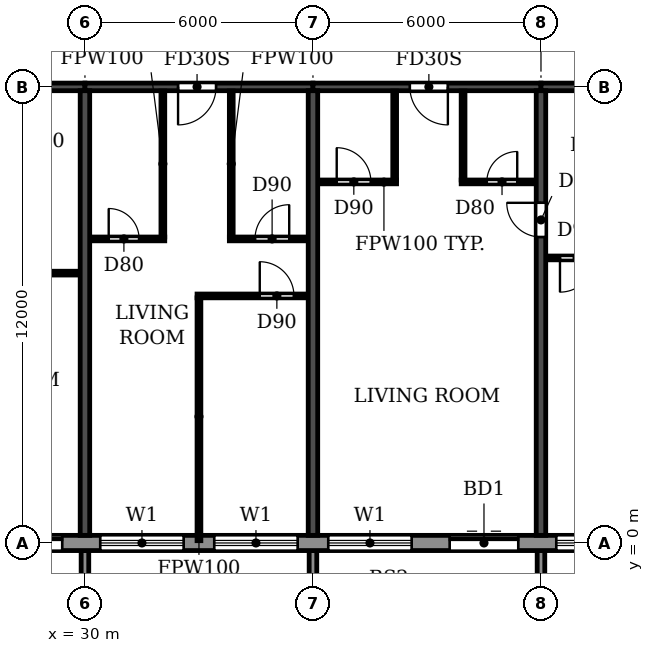
"""IFC4 building model, lengths in metres.
Left out: names, types, materials, properties, quantities, classifications, styles, units other than length and angle.
Written with IfcOpenShell. Run it as: python <this file> out.ifc"""

import sys

from ifc_helpers import new_model, si_unit, direction, frame, frame_2d, origin, place, context, subcontext, project, spatial, polyline, rectangle, outline, extrude, source, transform, mapped, element, fill, save


model = new_model("IFC4")
c1 = context("Model", 3, precision=1e-05, world=origin(), true_north=direction((0.0, 1.0)))
c2 = subcontext(c1, "Body", "Model", "MODEL_VIEW")
j1 = project(units=[si_unit("LENGTHUNIT", "METRE"), si_unit("PLANEANGLEUNIT", "RADIAN")], contexts=[c1])
p1 = place(None, origin())
s1 = spatial("IfcSite", under=j1, at=p1, CompositionType="ELEMENT")
p2 = place(p1, origin())
s2 = spatial("IfcBuilding", under=s1, at=p2, CompositionType="ELEMENT")
p3 = place(p2, frame((0.0, 0.0, 171.9)))
s3 = spatial("IfcBuildingStorey", under=s2, at=p3, CompositionType="ELEMENT", Elevation=171.9)
for number, where, z_axis, x_axis in (
    (1, (30.0, 0.2, 0.0), (0.0, 0.0, 1.0), (0.0, 1.0, 0.0)),
    (2, (36.0, 0.2, 0.0), (0.0, 0.0, 1.0), (0.0, 1.0, 0.0)),
):
    element("IfcWall", number, at=place(p3, frame(where, z_axis=z_axis, x_axis=x_axis)), inside=s3, PredefinedType="SHEAR", context=c2, shape_type="SweptSolid", body=[
        extrude(rectangle(XDim=11.7, YDim=0.25, at=frame_2d((5.85, 0.0))), origin(), (0.0, 0.0, 1.0), 3.08),
    ])
p4 = place(p3, frame((42.0, 0.2, 0.0), z_axis=(0.0, 0.0, 1.0), x_axis=(0.0, 1.0, 0.0)))
e3 = element("IfcWall", 3, at=p4, inside=s3, PredefinedType="SHEAR", context=c2, shape_type="SweptSolid", body=[
    extrude(rectangle(XDim=11.7, YDim=0.25, at=frame_2d((5.85, 0.0))), origin(), (0.0, 0.0, 1.0), 3.08),
])
p5 = place(p4, frame((7.85, 0.0, 0.0)))
e4 = element("IfcOpeningElement", 4, at=p5, cuts=e3, PredefinedType="OPENING", context=c2, shape_type="SweptSolid", body=[
    extrude(rectangle(XDim=0.9, YDim=2.1, at=frame_2d((0.45, 1.05))), frame((0.0, 0.135, 0.0), z_axis=(0.0, -1.0, 0.0), x_axis=(1.0, 0.0, 0.0)), (0.0, 0.0, 1.0), 0.27),
])
p6 = place(p3, frame((24.0, 12.0, 0.0), z_axis=(0.0, 0.0, 1.0), x_axis=(1.0, 0.0, 0.0)))
e5 = element("IfcWall", 5, at=p6, inside=s3, PredefinedType="SHEAR", context=c2, shape_type="SweptSolid", body=[
    extrude(rectangle(XDim=6.0, YDim=0.2, at=frame_2d((3.0, 0.0))), origin(), (0.0, 0.0, 1.0), 2.48),
])
p7 = place(p6, frame((2.55, 0.0, 0.0)))
e6 = element("IfcOpeningElement", 6, at=p7, cuts=e5, PredefinedType="OPENING", context=c2, shape_type="SweptSolid", body=[
    extrude(rectangle(XDim=1.0, YDim=2.1, at=frame_2d((0.5, 1.05))), frame((0.0, 0.11, 0.0), z_axis=(0.0, -1.0, 0.0), x_axis=(1.0, 0.0, 0.0)), (0.0, 0.0, 1.0), 0.22),
])
p8 = place(p3, frame((30.0, 12.0, 0.0), z_axis=(0.0, 0.0, 1.0), x_axis=(1.0, 0.0, 0.0)))
e7 = element("IfcWall", 7, at=p8, inside=s3, PredefinedType="SHEAR", context=c2, shape_type="SweptSolid", body=[
    extrude(rectangle(XDim=6.0, YDim=0.2, at=frame_2d((3.0, 0.0))), origin(), (0.0, 0.0, 1.0), 2.48),
])
p9 = place(p8, frame((2.45, 0.0, 0.0)))
e8 = element("IfcOpeningElement", 8, at=p9, cuts=e7, PredefinedType="OPENING", context=c2, shape_type="SweptSolid", body=[
    extrude(rectangle(XDim=1.0, YDim=2.1, at=frame_2d((0.5, 1.05))), frame((0.0, 0.11, 0.0), z_axis=(0.0, -1.0, 0.0), x_axis=(1.0, 0.0, 0.0)), (0.0, 0.0, 1.0), 0.22),
])
p10 = place(p3, frame((36.0, 12.0, 0.0), z_axis=(0.0, 0.0, 1.0), x_axis=(1.0, 0.0, 0.0)))
e9 = element("IfcWall", 9, at=p10, inside=s3, PredefinedType="SHEAR", context=c2, shape_type="SweptSolid", body=[
    extrude(rectangle(XDim=6.0, YDim=0.2, at=frame_2d((3.0, 0.0))), origin(), (0.0, 0.0, 1.0), 2.48),
])
p11 = place(p10, frame((2.55, 0.0, 0.0)))
e10 = element("IfcOpeningElement", 10, at=p11, cuts=e9, PredefinedType="OPENING", context=c2, shape_type="SweptSolid", body=[
    extrude(rectangle(XDim=1.0, YDim=2.1, at=frame_2d((0.5, 1.05))), frame((0.0, 0.11, 0.0), z_axis=(0.0, -1.0, 0.0), x_axis=(1.0, 0.0, 0.0)), (0.0, 0.0, 1.0), 0.22),
])
p12 = place(p3, frame((42.0, 12.0, 0.0), z_axis=(0.0, 0.0, 1.0), x_axis=(1.0, 0.0, 0.0)))
e11 = element("IfcWall", 11, at=p12, inside=s3, PredefinedType="SHEAR", context=c2, shape_type="SweptSolid", body=[
    extrude(rectangle(XDim=6.0, YDim=0.2, at=frame_2d((3.0, 0.0))), origin(), (0.0, 0.0, 1.0), 2.48),
])
p13 = place(p3, frame((22.683, 0.0, 0.0), z_axis=(0.0, 0.0, 1.0), x_axis=(1.0, 0.0, 0.0)))
e12 = element("IfcWall", 12, at=p13, inside=s3, PredefinedType="STANDARD", context=c2, shape_type="SweptSolid", body=[
    extrude(rectangle(XDim=56.634, YDim=0.4, at=frame_2d((28.317, 0.0))), origin(), (0.0, 0.0, 1.0), 3.08),
])
p14 = place(p13, frame((1.717, 0.0, 0.9)))
e13 = element("IfcOpeningElement", 13, at=p14, cuts=e12, PredefinedType="OPENING", context=c2, shape_type="SweptSolid", body=[
    extrude(rectangle(XDim=2.2, YDim=1.5, at=frame_2d((1.1, 0.75))), frame((0.0, 0.21, 0.0), z_axis=(0.0, -1.0, 0.0), x_axis=(1.0, 0.0, 0.0)), (0.0, 0.0, 1.0), 0.42),
])
p15 = place(p13, frame((4.917, 0.0, 0.0)))
e14 = element("IfcOpeningElement", 14, at=p15, cuts=e12, PredefinedType="OPENING", context=c2, shape_type="SweptSolid", body=[
    extrude(rectangle(XDim=1.8, YDim=2.4, at=frame_2d((0.9, 1.2))), frame((0.0, 0.21, 0.0), z_axis=(0.0, -1.0, 0.0), x_axis=(1.0, 0.0, 0.0)), (0.0, 0.0, 1.0), 0.42),
])
p16 = place(p13, frame((7.717, 0.0, 0.9)))
e15 = element("IfcOpeningElement", 15, at=p16, cuts=e12, PredefinedType="OPENING", context=c2, shape_type="SweptSolid", body=[
    extrude(rectangle(XDim=2.2, YDim=1.5, at=frame_2d((1.1, 0.75))), frame((0.0, 0.21, 0.0), z_axis=(0.0, -1.0, 0.0), x_axis=(1.0, 0.0, 0.0)), (0.0, 0.0, 1.0), 0.42),
])
p17 = place(p13, frame((10.717, 0.0, 0.9)))
e16 = element("IfcOpeningElement", 16, at=p17, cuts=e12, PredefinedType="OPENING", context=c2, shape_type="SweptSolid", body=[
    extrude(rectangle(XDim=2.2, YDim=1.5, at=frame_2d((1.1, 0.75))), frame((0.0, 0.21, 0.0), z_axis=(0.0, -1.0, 0.0), x_axis=(1.0, 0.0, 0.0)), (0.0, 0.0, 1.0), 0.42),
])
p18 = place(p13, frame((13.717, 0.0, 0.9)))
e17 = element("IfcOpeningElement", 17, at=p18, cuts=e12, PredefinedType="OPENING", context=c2, shape_type="SweptSolid", body=[
    extrude(rectangle(XDim=2.2, YDim=1.5, at=frame_2d((1.1, 0.75))), frame((0.0, 0.21, 0.0), z_axis=(0.0, -1.0, 0.0), x_axis=(1.0, 0.0, 0.0)), (0.0, 0.0, 1.0), 0.42),
])
p19 = place(p13, frame((16.917, 0.0, 0.0)))
e18 = element("IfcOpeningElement", 18, at=p19, cuts=e12, PredefinedType="OPENING", context=c2, shape_type="SweptSolid", body=[
    extrude(rectangle(XDim=1.8, YDim=2.4, at=frame_2d((0.9, 1.2))), frame((0.0, 0.21, 0.0), z_axis=(0.0, -1.0, 0.0), x_axis=(1.0, 0.0, 0.0)), (0.0, 0.0, 1.0), 0.42),
])
p20 = place(p13, frame((19.717, 0.0, 0.9)))
e19 = element("IfcOpeningElement", 19, at=p20, cuts=e12, PredefinedType="OPENING", context=c2, shape_type="SweptSolid", body=[
    extrude(rectangle(XDim=2.2, YDim=1.5, at=frame_2d((1.1, 0.75))), frame((0.0, 0.21, 0.0), z_axis=(0.0, -1.0, 0.0), x_axis=(1.0, 0.0, 0.0)), (0.0, 0.0, 1.0), 0.42),
])
p21 = place(p13, frame((22.717, 0.0, 0.9)))
e20 = element("IfcOpeningElement", 20, at=p21, cuts=e12, PredefinedType="OPENING", context=c2, shape_type="SweptSolid", body=[
    extrude(rectangle(XDim=2.2, YDim=1.5, at=frame_2d((1.1, 0.75))), frame((0.0, 0.21, 0.0), z_axis=(0.0, -1.0, 0.0), x_axis=(1.0, 0.0, 0.0)), (0.0, 0.0, 1.0), 0.42),
])
p22 = place(p13, frame((25.917, 0.0, 0.0)))
e21 = element("IfcOpeningElement", 21, at=p22, cuts=e12, PredefinedType="OPENING", context=c2, shape_type="SweptSolid", body=[
    extrude(rectangle(XDim=1.8, YDim=2.4, at=frame_2d((0.9, 1.2))), frame((0.0, 0.21, 0.0), z_axis=(0.0, -1.0, 0.0), x_axis=(1.0, 0.0, 0.0)), (0.0, 0.0, 1.0), 0.42),
])
p23 = place(p13, frame((28.717, 0.0, 0.9)))
e22 = element("IfcOpeningElement", 22, at=p23, cuts=e12, PredefinedType="OPENING", context=c2, shape_type="SweptSolid", body=[
    extrude(rectangle(XDim=2.2, YDim=1.5, at=frame_2d((1.1, 0.75))), frame((0.0, 0.21, 0.0), z_axis=(0.0, -1.0, 0.0), x_axis=(1.0, 0.0, 0.0)), (0.0, 0.0, 1.0), 0.42),
])
p24 = place(p13, frame((31.717, 0.0, 0.9)))
e23 = element("IfcOpeningElement", 23, at=p24, cuts=e12, PredefinedType="OPENING", context=c2, shape_type="SweptSolid", body=[
    extrude(rectangle(XDim=2.2, YDim=1.5, at=frame_2d((1.1, 0.75))), frame((0.0, 0.21, 0.0), z_axis=(0.0, -1.0, 0.0), x_axis=(1.0, 0.0, 0.0)), (0.0, 0.0, 1.0), 0.42),
])
p25 = place(p13, frame((34.717, 0.0, 0.9)))
e24 = element("IfcOpeningElement", 24, at=p25, cuts=e12, PredefinedType="OPENING", context=c2, shape_type="SweptSolid", body=[
    extrude(rectangle(XDim=2.2, YDim=1.5, at=frame_2d((1.1, 0.75))), frame((0.0, 0.21, 0.0), z_axis=(0.0, -1.0, 0.0), x_axis=(1.0, 0.0, 0.0)), (0.0, 0.0, 1.0), 0.42),
])
p26 = place(p13, frame((37.717, 0.0, 0.9)))
e25 = element("IfcOpeningElement", 25, at=p26, cuts=e12, PredefinedType="OPENING", context=c2, shape_type="SweptSolid", body=[
    extrude(rectangle(XDim=2.2, YDim=1.5, at=frame_2d((1.1, 0.75))), frame((0.0, 0.21, 0.0), z_axis=(0.0, -1.0, 0.0), x_axis=(1.0, 0.0, 0.0)), (0.0, 0.0, 1.0), 0.42),
])
p27 = place(p13, frame((40.917, 0.0, 0.0)))
e26 = element("IfcOpeningElement", 26, at=p27, cuts=e12, PredefinedType="OPENING", context=c2, shape_type="SweptSolid", body=[
    extrude(rectangle(XDim=1.8, YDim=2.4, at=frame_2d((0.9, 1.2))), frame((0.0, 0.21, 0.0), z_axis=(0.0, -1.0, 0.0), x_axis=(1.0, 0.0, 0.0)), (0.0, 0.0, 1.0), 0.42),
])
p28 = place(p13, frame((43.717, 0.0, 0.9)))
e27 = element("IfcOpeningElement", 27, at=p28, cuts=e12, PredefinedType="OPENING", context=c2, shape_type="SweptSolid", body=[
    extrude(rectangle(XDim=2.2, YDim=1.5, at=frame_2d((1.1, 0.75))), frame((0.0, 0.21, 0.0), z_axis=(0.0, -1.0, 0.0), x_axis=(1.0, 0.0, 0.0)), (0.0, 0.0, 1.0), 0.42),
])
p29 = place(p13, frame((46.717, 0.0, 0.9)))
e28 = element("IfcOpeningElement", 28, at=p29, cuts=e12, PredefinedType="OPENING", context=c2, shape_type="SweptSolid", body=[
    extrude(rectangle(XDim=2.2, YDim=1.5, at=frame_2d((1.1, 0.75))), frame((0.0, 0.21, 0.0), z_axis=(0.0, -1.0, 0.0), x_axis=(1.0, 0.0, 0.0)), (0.0, 0.0, 1.0), 0.42),
])
p30 = place(p13, frame((49.717, 0.0, 0.9)))
e29 = element("IfcOpeningElement", 29, at=p30, cuts=e12, PredefinedType="OPENING", context=c2, shape_type="SweptSolid", body=[
    extrude(rectangle(XDim=2.2, YDim=1.5, at=frame_2d((1.1, 0.75))), frame((0.0, 0.21, 0.0), z_axis=(0.0, -1.0, 0.0), x_axis=(1.0, 0.0, 0.0)), (0.0, 0.0, 1.0), 0.42),
])
p31 = place(p13, frame((52.917, 0.0, 0.0)))
e30 = element("IfcOpeningElement", 30, at=p31, cuts=e12, PredefinedType="OPENING", context=c2, shape_type="SweptSolid", body=[
    extrude(rectangle(XDim=1.8, YDim=2.4, at=frame_2d((0.9, 1.2))), frame((0.0, 0.21, 0.0), z_axis=(0.0, -1.0, 0.0), x_axis=(1.0, 0.0, 0.0)), (0.0, 0.0, 1.0), 0.42),
])
m1 = source(origin(), c2, "Body", "SweptSolid", [
    extrude(outline(polyline([(0.0, 0.0), (0.2, 0.0), (0.2, 1.65), (0.0, 1.65), (0.0, 0.0)])), origin(), (0.0, 0.0, 1.0), 3.1),
])
for number, where in (
    (31, (29.9, -1.85, 0.0)),
    (32, (35.9, -1.85, 0.0)),
    (33, (41.9, -1.85, 0.0)),
):
    element("IfcWall", number, at=place(p3, frame(where)), inside=s3, PredefinedType="STANDARD", context=c2, shape_type="MappedRepresentation", body=[
        mapped(m1, transform((0.0, 0.0, 0.0))),
    ])
p32 = place(p3, frame((32.95, 6.5, 0.0), z_axis=(0.0, 0.0, 1.0), x_axis=(1.0, 0.0, 0.0)))
e34 = element("IfcWall", 34, at=p32, inside=s3, PredefinedType="PARTITIONING", context=c2, shape_type="SweptSolid", body=[
    extrude(rectangle(XDim=2.915, YDim=0.1, at=frame_2d((1.458, 0.0))), origin(), (0.0, 0.0, 1.0), 3.08),
])
p33 = place(p32, frame((1.65, 0.0, 0.0)))
e35 = element("IfcOpeningElement", 35, at=p33, cuts=e34, PredefinedType="OPENING", context=c2, shape_type="SweptSolid", body=[
    extrude(rectangle(XDim=0.9, YDim=2.1, at=frame_2d((0.45, 1.05))), frame((0.0, 0.06, 0.0), z_axis=(0.0, -1.0, 0.0), x_axis=(1.0, 0.0, 0.0)), (0.0, 0.0, 1.0), 0.12),
])
p34 = place(p3, frame((27.9, 7.1, 0.0), z_axis=(0.0, 0.0, 1.0), x_axis=(1.0, 0.0, 0.0)))
e36 = element("IfcWall", 36, at=p34, inside=s3, PredefinedType="PARTITIONING", context=c2, shape_type="SweptSolid", body=[
    extrude(rectangle(XDim=1.965, YDim=0.1, at=frame_2d((0.982, 0.0))), origin(), (0.0, 0.0, 1.0), 3.08),
])
p35 = place(p3, frame((42.135, 7.5, 0.0), z_axis=(0.0, 0.0, 1.0), x_axis=(1.0, 0.0, 0.0)))
e37 = element("IfcWall", 37, at=p35, inside=s3, PredefinedType="PARTITIONING", context=c2, shape_type="SweptSolid", body=[
    extrude(rectangle(XDim=2.765, YDim=0.1, at=frame_2d((1.382, 0.0))), origin(), (0.0, 0.0, 1.0), 3.08),
])
p36 = place(p35, frame((0.365, 0.0, 0.0)))
e38 = element("IfcOpeningElement", 38, at=p36, cuts=e37, PredefinedType="OPENING", context=c2, shape_type="SweptSolid", body=[
    extrude(rectangle(XDim=0.9, YDim=2.1, at=frame_2d((0.45, 1.05))), frame((0.0, 0.06, 0.0), z_axis=(0.0, -1.0, 0.0), x_axis=(1.0, 0.0, 0.0)), (0.0, 0.0, 1.0), 0.12),
])
p37 = place(p3, frame((30.135, 8.0, 0.0), z_axis=(0.0, 0.0, 1.0), x_axis=(1.0, 0.0, 0.0)))
e39 = element("IfcWall", 39, at=p37, inside=s3, PredefinedType="PARTITIONING", context=c2, shape_type="SweptSolid", body=[
    extrude(rectangle(XDim=1.965, YDim=0.1, at=frame_2d((0.982, 0.0))), origin(), (0.0, 0.0, 1.0), 3.08),
])
p38 = place(p37, frame((0.49, 0.0, 0.0)))
e40 = element("IfcOpeningElement", 40, at=p38, cuts=e39, PredefinedType="OPENING", context=c2, shape_type="SweptSolid", body=[
    extrude(rectangle(XDim=0.8, YDim=2.1, at=frame_2d((0.4, 1.05))), frame((0.0, 0.06, 0.0), z_axis=(0.0, -1.0, 0.0), x_axis=(1.0, 0.0, 0.0)), (0.0, 0.0, 1.0), 0.12),
])
p39 = place(p3, frame((33.8, 8.0, 0.0), z_axis=(0.0, 0.0, 1.0), x_axis=(1.0, 0.0, 0.0)))
e41 = element("IfcWall", 41, at=p39, inside=s3, PredefinedType="PARTITIONING", context=c2, shape_type="SweptSolid", body=[
    extrude(rectangle(XDim=2.065, YDim=0.1, at=frame_2d((1.032, 0.0))), origin(), (0.0, 0.0, 1.0), 3.08),
])
p40 = place(p39, frame((0.675, 0.0, 0.0)))
e42 = element("IfcOpeningElement", 42, at=p40, cuts=e41, PredefinedType="OPENING", context=c2, shape_type="SweptSolid", body=[
    extrude(rectangle(XDim=0.9, YDim=2.1, at=frame_2d((0.45, 1.05))), frame((0.0, 0.06, 0.0), z_axis=(0.0, -1.0, 0.0), x_axis=(1.0, 0.0, 0.0)), (0.0, 0.0, 1.0), 0.12),
])
p41 = place(p3, frame((36.135, 9.5, 0.0), z_axis=(0.0, 0.0, 1.0), x_axis=(1.0, 0.0, 0.0)))
e43 = element("IfcWall", 43, at=p41, inside=s3, PredefinedType="PARTITIONING", context=c2, shape_type="SweptSolid", body=[
    extrude(rectangle(XDim=2.065, YDim=0.1, at=frame_2d((1.032, 0.0))), origin(), (0.0, 0.0, 1.0), 3.08),
])
p42 = place(p41, frame((0.49, 0.0, 0.0)))
e44 = element("IfcOpeningElement", 44, at=p42, cuts=e43, PredefinedType="OPENING", context=c2, shape_type="SweptSolid", body=[
    extrude(rectangle(XDim=0.9, YDim=2.1, at=frame_2d((0.45, 1.05))), frame((0.0, 0.06, 0.0), z_axis=(0.0, -1.0, 0.0), x_axis=(1.0, 0.0, 0.0)), (0.0, 0.0, 1.0), 0.12),
])
p43 = place(p3, frame((39.9, 9.5, 0.0), z_axis=(0.0, 0.0, 1.0), x_axis=(1.0, 0.0, 0.0)))
e45 = element("IfcWall", 45, at=p43, inside=s3, PredefinedType="PARTITIONING", context=c2, shape_type="SweptSolid", body=[
    extrude(rectangle(XDim=1.965, YDim=0.1, at=frame_2d((0.982, 0.0))), origin(), (0.0, 0.0, 1.0), 3.08),
])
p44 = place(p43, frame((0.675, 0.0, 0.0)))
e46 = element("IfcOpeningElement", 46, at=p44, cuts=e45, PredefinedType="OPENING", context=c2, shape_type="SweptSolid", body=[
    extrude(rectangle(XDim=0.8, YDim=2.1, at=frame_2d((0.4, 1.05))), frame((0.0, 0.06, 0.0), z_axis=(0.0, -1.0, 0.0), x_axis=(1.0, 0.0, 0.0)), (0.0, 0.0, 1.0), 0.12),
])
p45 = place(p3, frame((32.05, 8.05, 0.0), z_axis=(0.0, 0.0, 1.0), x_axis=(0.0, 1.0, 0.0)))
e47 = element("IfcWall", 47, at=p45, inside=s3, PredefinedType="PARTITIONING", context=c2, shape_type="SweptSolid", body=[
    extrude(rectangle(XDim=3.84, YDim=0.1, at=frame_2d((1.92, 0.0))), origin(), (0.0, 0.0, 1.0), 3.08),
])
p46 = place(p3, frame((33.0, 0.06, 0.0), z_axis=(0.0, 0.0, 1.0), x_axis=(0.0, 1.0, 0.0)))
e48 = element("IfcWall", 48, at=p46, inside=s3, PredefinedType="PARTITIONING", context=c2, shape_type="SweptSolid", body=[
    extrude(rectangle(XDim=6.39, YDim=0.1, at=frame_2d((3.195, 0.0))), origin(), (0.0, 0.0, 1.0), 3.08),
])
p47 = place(p3, frame((33.85, 8.05, 0.0), z_axis=(0.0, 0.0, 1.0), x_axis=(0.0, 1.0, 0.0)))
e49 = element("IfcWall", 49, at=p47, inside=s3, PredefinedType="PARTITIONING", context=c2, shape_type="SweptSolid", body=[
    extrude(rectangle(XDim=3.84, YDim=0.1, at=frame_2d((1.92, 0.0))), origin(), (0.0, 0.0, 1.0), 3.08),
])
for number, where, z_axis, x_axis in (
    (50, (38.15, 9.55, 0.0), (0.0, 0.0, 1.0), (0.0, 1.0, 0.0)),
    (51, (39.95, 9.55, 0.0), (0.0, 0.0, 1.0), (0.0, 1.0, 0.0)),
):
    element("IfcWall", number, at=place(p3, frame(where, z_axis=z_axis, x_axis=x_axis)), inside=s3, PredefinedType="PARTITIONING", context=c2, shape_type="SweptSolid", body=[
        extrude(rectangle(XDim=2.34, YDim=0.1, at=frame_2d((1.17, 0.0))), origin(), (0.0, 0.0, 1.0), 3.08),
    ])
p48 = place(p15, origin())
e52 = element("IfcDoor", 52, at=p48, inside=s3, OperationType="DOUBLE_DOOR_SLIDING", PredefinedType="DOOR", context=c2, shape_type="SweptSolid", body=[
    extrude(rectangle(XDim=1.8, YDim=2.4, at=frame_2d((0.9, 1.2))), frame((0.0, 0.025, 0.0), z_axis=(0.0, -1.0, 0.0), x_axis=(1.0, 0.0, 0.0)), (0.0, 0.0, 1.0), 0.05),
])
fill(e14, e52)
p49 = place(p16, origin())
e53 = element("IfcWindow", 53, at=p49, inside=s3, PartitioningType="DOUBLE_PANEL_HORIZONTAL", PredefinedType="WINDOW", context=c2, shape_type="SweptSolid", body=[
    extrude(rectangle(XDim=2.2, YDim=1.5, at=frame_2d((1.1, 0.75))), frame((0.0, 0.03, 0.0), z_axis=(0.0, -1.0, 0.0), x_axis=(1.0, 0.0, 0.0)), (0.0, 0.0, 1.0), 0.06),
])
fill(e15, e53)
p50 = place(p17, origin())
e54 = element("IfcWindow", 54, at=p50, inside=s3, PartitioningType="DOUBLE_PANEL_HORIZONTAL", PredefinedType="WINDOW", context=c2, shape_type="SweptSolid", body=[
    extrude(rectangle(XDim=2.2, YDim=1.5, at=frame_2d((1.1, 0.75))), frame((0.0, 0.03, 0.0), z_axis=(0.0, -1.0, 0.0), x_axis=(1.0, 0.0, 0.0)), (0.0, 0.0, 1.0), 0.06),
])
fill(e16, e54)
p51 = place(p18, origin())
e55 = element("IfcWindow", 55, at=p51, inside=s3, PartitioningType="DOUBLE_PANEL_HORIZONTAL", PredefinedType="WINDOW", context=c2, shape_type="SweptSolid", body=[
    extrude(rectangle(XDim=2.2, YDim=1.5, at=frame_2d((1.1, 0.75))), frame((0.0, 0.03, 0.0), z_axis=(0.0, -1.0, 0.0), x_axis=(1.0, 0.0, 0.0)), (0.0, 0.0, 1.0), 0.06),
])
fill(e17, e55)
p52 = place(p19, origin())
e56 = element("IfcDoor", 56, at=p52, inside=s3, OperationType="DOUBLE_DOOR_SLIDING", PredefinedType="DOOR", context=c2, shape_type="SweptSolid", body=[
    extrude(rectangle(XDim=1.8, YDim=2.4, at=frame_2d((0.9, 1.2))), frame((0.0, 0.025, 0.0), z_axis=(0.0, -1.0, 0.0), x_axis=(1.0, 0.0, 0.0)), (0.0, 0.0, 1.0), 0.05),
])
fill(e18, e56)
p53 = place(p20, origin())
e57 = element("IfcWindow", 57, at=p53, inside=s3, PartitioningType="DOUBLE_PANEL_HORIZONTAL", PredefinedType="WINDOW", context=c2, shape_type="SweptSolid", body=[
    extrude(rectangle(XDim=2.2, YDim=1.5, at=frame_2d((1.1, 0.75))), frame((0.0, 0.03, 0.0), z_axis=(0.0, -1.0, 0.0), x_axis=(1.0, 0.0, 0.0)), (0.0, 0.0, 1.0), 0.06),
])
fill(e19, e57)
p54 = place(p38, origin())
e58 = element("IfcDoor", 58, at=p54, inside=s3, OperationType="SINGLE_SWING_LEFT", PredefinedType="DOOR", context=c2, shape_type="SweptSolid", body=[
    extrude(rectangle(XDim=0.8, YDim=2.1, at=frame_2d((0.4, 1.05))), frame((0.0, 0.025, 0.0), z_axis=(0.0, -1.0, 0.0), x_axis=(1.0, 0.0, 0.0)), (0.0, 0.0, 1.0), 0.05),
])
fill(e40, e58)
p55 = place(p9, frame((1.0, 0.0, 0.0), z_axis=(0.0, 0.0, 1.0), x_axis=(-1.0, 0.0, 0.0)))
e59 = element("IfcDoor", 59, at=p55, inside=s3, OperationType="SINGLE_SWING_RIGHT", PredefinedType="DOOR", context=c2, shape_type="SweptSolid", body=[
    extrude(rectangle(XDim=1.0, YDim=2.1, at=frame_2d((0.5, 1.05))), frame((0.0, 0.025, 0.0), z_axis=(0.0, -1.0, 0.0), x_axis=(1.0, 0.0, 0.0)), (0.0, 0.0, 1.0), 0.05),
])
fill(e8, e59)
p56 = place(p40, origin())
e60 = element("IfcDoor", 60, at=p56, inside=s3, OperationType="SINGLE_SWING_RIGHT", PredefinedType="DOOR", context=c2, shape_type="SweptSolid", body=[
    extrude(rectangle(XDim=0.9, YDim=2.1, at=frame_2d((0.45, 1.05))), frame((0.0, 0.025, 0.0), z_axis=(0.0, -1.0, 0.0), x_axis=(1.0, 0.0, 0.0)), (0.0, 0.0, 1.0), 0.05),
])
fill(e42, e60)
p57 = place(p33, origin())
e61 = element("IfcDoor", 61, at=p57, inside=s3, OperationType="SINGLE_SWING_LEFT", PredefinedType="DOOR", context=c2, shape_type="SweptSolid", body=[
    extrude(rectangle(XDim=0.9, YDim=2.1, at=frame_2d((0.45, 1.05))), frame((0.0, 0.025, 0.0), z_axis=(0.0, -1.0, 0.0), x_axis=(1.0, 0.0, 0.0)), (0.0, 0.0, 1.0), 0.05),
])
fill(e35, e61)
p58 = place(p36, frame((0.9, 0.0, 0.0), z_axis=(0.0, 0.0, 1.0), x_axis=(-1.0, 0.0, 0.0)))
e62 = element("IfcDoor", 62, at=p58, inside=s3, OperationType="SINGLE_SWING_RIGHT", PredefinedType="DOOR", context=c2, shape_type="SweptSolid", body=[
    extrude(rectangle(XDim=0.9, YDim=2.1, at=frame_2d((0.45, 1.05))), frame((0.0, 0.025, 0.0), z_axis=(0.0, -1.0, 0.0), x_axis=(1.0, 0.0, 0.0)), (0.0, 0.0, 1.0), 0.05),
])
fill(e38, e62)
p59 = place(p42, origin())
e63 = element("IfcDoor", 63, at=p59, inside=s3, OperationType="SINGLE_SWING_LEFT", PredefinedType="DOOR", context=c2, shape_type="SweptSolid", body=[
    extrude(rectangle(XDim=0.9, YDim=2.1, at=frame_2d((0.45, 1.05))), frame((0.0, 0.025, 0.0), z_axis=(0.0, -1.0, 0.0), x_axis=(1.0, 0.0, 0.0)), (0.0, 0.0, 1.0), 0.05),
])
fill(e44, e63)
p60 = place(p11, frame((1.0, 0.0, 0.0), z_axis=(0.0, 0.0, 1.0), x_axis=(-1.0, 0.0, 0.0)))
e64 = element("IfcDoor", 64, at=p60, inside=s3, OperationType="SINGLE_SWING_LEFT", PredefinedType="DOOR", context=c2, shape_type="SweptSolid", body=[
    extrude(rectangle(XDim=1.0, YDim=2.1, at=frame_2d((0.5, 1.05))), frame((0.0, 0.025, 0.0), z_axis=(0.0, -1.0, 0.0), x_axis=(1.0, 0.0, 0.0)), (0.0, 0.0, 1.0), 0.05),
])
fill(e10, e64)
p61 = place(p44, origin())
e65 = element("IfcDoor", 65, at=p61, inside=s3, OperationType="SINGLE_SWING_RIGHT", PredefinedType="DOOR", context=c2, shape_type="SweptSolid", body=[
    extrude(rectangle(XDim=0.8, YDim=2.1, at=frame_2d((0.4, 1.05))), frame((0.0, 0.025, 0.0), z_axis=(0.0, -1.0, 0.0), x_axis=(1.0, 0.0, 0.0)), (0.0, 0.0, 1.0), 0.05),
])
fill(e46, e65)
p62 = place(p5, origin())
e66 = element("IfcDoor", 66, at=p62, inside=s3, OperationType="SINGLE_SWING_RIGHT", PredefinedType="DOOR", context=c2, shape_type="SweptSolid", body=[
    extrude(rectangle(XDim=0.9, YDim=2.1, at=frame_2d((0.45, 1.05))), frame((0.0, 0.025, 0.0), z_axis=(0.0, -1.0, 0.0), x_axis=(1.0, 0.0, 0.0)), (0.0, 0.0, 1.0), 0.05),
])
fill(e4, e66)
save(model, sys.argv[1])
